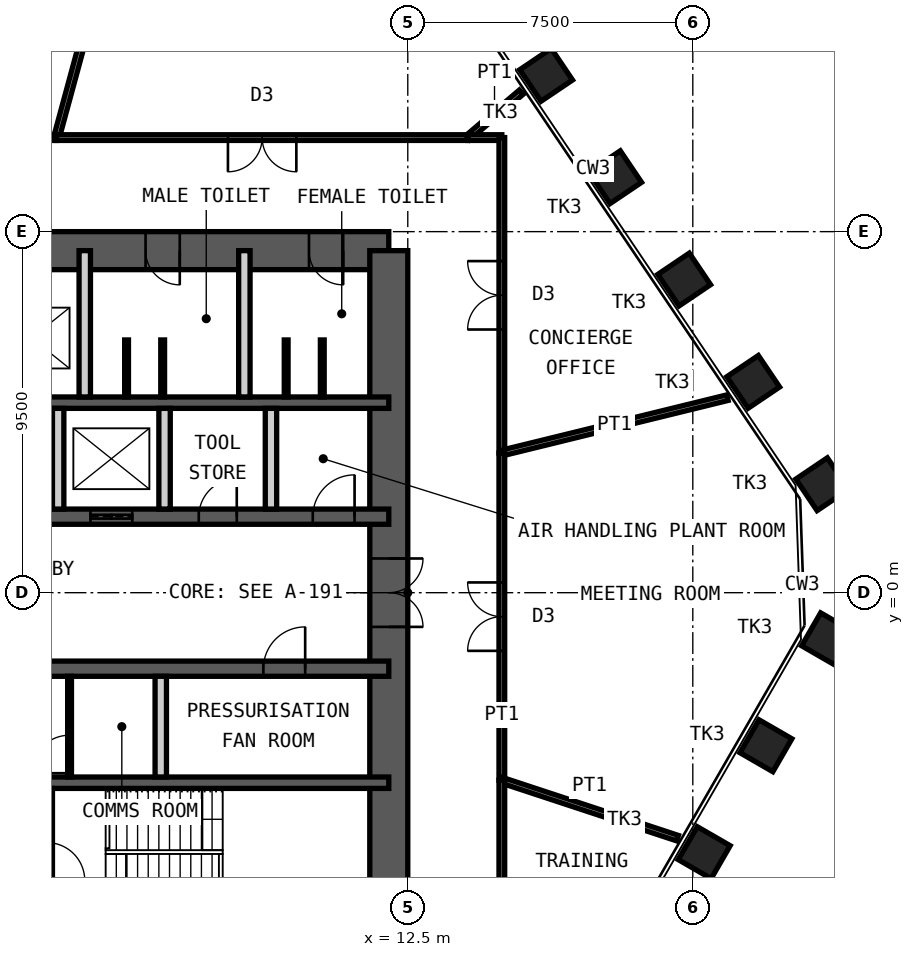
"""IFC4 building model, lengths in metres.
Left out: names, types, materials, properties, quantities, classifications, styles, units other than length and angle.
Written with IfcOpenShell. Run it as: python <this file> out.ifc"""

import sys

from ifc_helpers import new_model, si_unit, direction, frame, frame_2d, origin, origin_2d, place, context, subcontext, project, spatial, rectangle, hollow_rectangle, extrude, element, fill, save


model = new_model("IFC4")
c1 = context("Model", 3, precision=1e-05, world=origin(), true_north=direction((0.0, 1.0)))
c2 = subcontext(c1, "Body", "Model", "MODEL_VIEW")
j1 = project(units=[si_unit("LENGTHUNIT", "METRE"), si_unit("PLANEANGLEUNIT", "RADIAN")], contexts=[c1])
p1 = place(None, origin())
s1 = spatial("IfcSite", under=j1, at=p1, CompositionType="ELEMENT")
p2 = place(p1, origin())
s2 = spatial("IfcBuilding", under=s1, at=p2, CompositionType="ELEMENT")
p3 = place(p2, frame((0.0, 0.0, 262.0)))
s3 = spatial("IfcBuildingStorey", under=s2, at=p3, CompositionType="ELEMENT", Elevation=262.0)
for number, where, z_axis, x_axis in (
    (1, (16.141, 13.625, 0.0), (0.0, 0.0, 1.0), (-0.559, 0.829, 0.0)),
    (2, (17.957, 10.932, 0.0), (0.0, 0.0, 1.0), (-0.559, 0.829, 0.0)),
    (3, (19.773, 8.239, 0.0), (0.0, 0.0, 1.0), (-0.559, 0.829, 0.0)),
    (4, (21.589, 5.547, 0.0), (0.0, 0.0, 1.0), (-0.559, 0.829, 0.0)),
    (5, (23.406, 2.854, 0.0), (0.0, 0.0, 1.0), (-0.559, 0.829, 0.0)),
    (6, (23.548, -1.214, 0.0), (0.0, 0.0, 1.0), (0.5, 0.866, 0.0)),
    (7, (21.924, -4.027, 0.0), (0.0, 0.0, 1.0), (0.5, 0.866, 0.0)),
    (8, (20.3, -6.84, 0.0), (0.0, 0.0, 1.0), (0.5, 0.866, 0.0)),
):
    element("IfcColumn", number, at=place(p3, frame(where, z_axis=z_axis, x_axis=x_axis)), inside=s3, PredefinedType="COLUMN", context=c2, shape_type="SweptSolid", body=[
        extrude(hollow_rectangle(XDim=1.0, YDim=1.0, WallThickness=0.08, at=origin_2d()), origin(), (0.0, 0.0, 1.0), 4.2),
    ])
p4 = place(p3, frame((-12.0, 9.0, 0.0), z_axis=(0.0, 0.0, 1.0), x_axis=(1.0, 0.0, 0.0)))
e9 = element("IfcWall", 9, at=p4, inside=s3, PredefinedType="SHEAR", context=c2, shape_type="SweptSolid", body=[
    extrude(rectangle(XDim=24.0, YDim=1.0, at=frame_2d((12.0, 0.0))), origin(), (0.0, 0.0, 1.0), 4.2),
])
p5 = place(p4, frame((10.4, 0.0, 0.0)))
e10 = element("IfcOpeningElement", 10, at=p5, cuts=e9, PredefinedType="OPENING", context=c2, shape_type="SweptSolid", body=[
    extrude(rectangle(XDim=1.0, YDim=2.1, at=frame_2d((0.5, 1.05))), frame((0.0, 0.51, 0.0), z_axis=(0.0, -1.0, 0.0), x_axis=(1.0, 0.0, 0.0)), (0.0, 0.0, 1.0), 1.02),
])
p6 = place(p4, frame((17.6, 0.0, 0.0)))
e11 = element("IfcOpeningElement", 11, at=p6, cuts=e9, PredefinedType="OPENING", context=c2, shape_type="SweptSolid", body=[
    extrude(rectangle(XDim=0.9, YDim=2.1, at=frame_2d((0.45, 1.05))), frame((0.0, 0.51, 0.0), z_axis=(0.0, -1.0, 0.0), x_axis=(1.0, 0.0, 0.0)), (0.0, 0.0, 1.0), 1.02),
])
p7 = place(p4, frame((21.9, 0.0, 0.0)))
e12 = element("IfcOpeningElement", 12, at=p7, cuts=e9, PredefinedType="OPENING", context=c2, shape_type="SweptSolid", body=[
    extrude(rectangle(XDim=0.9, YDim=2.1, at=frame_2d((0.45, 1.05))), frame((0.0, 0.51, 0.0), z_axis=(0.0, -1.0, 0.0), x_axis=(1.0, 0.0, 0.0)), (0.0, 0.0, 1.0), 1.02),
])
p8 = place(p3, frame((12.0, -9.0, 0.0), z_axis=(0.0, 0.0, 1.0), x_axis=(0.0, 1.0, 0.0)))
e13 = element("IfcWall", 13, at=p8, inside=s3, PredefinedType="SHEAR", context=c2, shape_type="SweptSolid", body=[
    extrude(rectangle(XDim=18.0, YDim=1.0, at=frame_2d((9.0, 0.0))), origin(), (0.0, 0.0, 1.0), 4.2),
])
p9 = place(p8, frame((8.1, 0.0, 0.0)))
e14 = element("IfcOpeningElement", 14, at=p9, cuts=e13, PredefinedType="OPENING", context=c2, shape_type="SweptSolid", body=[
    extrude(rectangle(XDim=1.8, YDim=2.1, at=frame_2d((0.9, 1.05))), frame((0.0, 0.51, 0.0), z_axis=(0.0, -1.0, 0.0), x_axis=(1.0, 0.0, 0.0)), (0.0, 0.0, 1.0), 1.02),
])
p10 = place(p3, frame((-12.0, 5.0, 0.0), z_axis=(0.0, 0.0, 1.0), x_axis=(1.0, 0.0, 0.0)))
e15 = element("IfcWall", 15, at=p10, inside=s3, PredefinedType="SHEAR", context=c2, shape_type="SweptSolid", body=[
    extrude(rectangle(XDim=24.0, YDim=0.3, at=frame_2d((12.0, 0.0))), origin(), (0.0, 0.0, 1.0), 4.2),
])
p11 = place(p3, frame((-12.0, 2.0, 0.0), z_axis=(0.0, 0.0, 1.0), x_axis=(1.0, 0.0, 0.0)))
e16 = element("IfcWall", 16, at=p11, inside=s3, PredefinedType="SHEAR", context=c2, shape_type="SweptSolid", body=[
    extrude(rectangle(XDim=24.0, YDim=0.4, at=frame_2d((12.0, 0.0))), origin(), (0.0, 0.0, 1.0), 4.2),
])
p12 = place(p11, frame((2.4, 0.0, 0.0)))
e17 = element("IfcOpeningElement", 17, at=p12, cuts=e16, PredefinedType="OPENING", context=c2, shape_type="SweptSolid", body=[
    extrude(rectangle(XDim=1.1, YDim=2.1, at=frame_2d((0.55, 1.05))), frame((0.0, 0.21, 0.0), z_axis=(0.0, -1.0, 0.0), x_axis=(1.0, 0.0, 0.0)), (0.0, 0.0, 1.0), 0.42),
])
p13 = place(p11, frame((22.0, 0.0, 0.0)))
e18 = element("IfcOpeningElement", 18, at=p13, cuts=e16, PredefinedType="OPENING", context=c2, shape_type="SweptSolid", body=[
    extrude(rectangle(XDim=1.1, YDim=2.1, at=frame_2d((0.55, 1.05))), frame((0.0, 0.21, 0.0), z_axis=(0.0, -1.0, 0.0), x_axis=(1.0, 0.0, 0.0)), (0.0, 0.0, 1.0), 0.42),
])
p14 = place(p11, frame((10.15, 0.0, 0.0)))
e19 = element("IfcOpeningElement", 19, at=p14, cuts=e16, PredefinedType="OPENING", context=c2, shape_type="SweptSolid", body=[
    extrude(rectangle(XDim=1.0, YDim=2.1, at=frame_2d((0.5, 1.05))), frame((0.0, 0.21, 0.0), z_axis=(0.0, -1.0, 0.0), x_axis=(1.0, 0.0, 0.0)), (0.0, 0.0, 1.0), 0.42),
])
p15 = place(p11, frame((6.9, 0.0, 0.0)))
e20 = element("IfcOpeningElement", 20, at=p15, cuts=e16, PredefinedType="OPENING", context=c2, shape_type="SweptSolid", body=[
    extrude(rectangle(XDim=1.0, YDim=2.1, at=frame_2d((0.5, 1.05))), frame((0.0, 0.21, 0.0), z_axis=(0.0, -1.0, 0.0), x_axis=(1.0, 0.0, 0.0)), (0.0, 0.0, 1.0), 0.42),
])
p16 = place(p11, frame((13.35, 0.0, 0.0)))
e21 = element("IfcOpeningElement", 21, at=p16, cuts=e16, PredefinedType="OPENING", context=c2, shape_type="SweptSolid", body=[
    extrude(rectangle(XDim=1.1, YDim=2.4, at=frame_2d((0.55, 1.2))), frame((0.0, 0.21, 0.0), z_axis=(0.0, -1.0, 0.0), x_axis=(1.0, 0.0, 0.0)), (0.0, 0.0, 1.0), 0.42),
])
p17 = place(p11, frame((16.15, 0.0, 0.0)))
e22 = element("IfcOpeningElement", 22, at=p17, cuts=e16, PredefinedType="OPENING", context=c2, shape_type="SweptSolid", body=[
    extrude(rectangle(XDim=1.1, YDim=2.4, at=frame_2d((0.55, 1.2))), frame((0.0, 0.21, 0.0), z_axis=(0.0, -1.0, 0.0), x_axis=(1.0, 0.0, 0.0)), (0.0, 0.0, 1.0), 0.42),
])
p18 = place(p11, frame((19.0, 0.0, 0.0)))
e23 = element("IfcOpeningElement", 23, at=p18, cuts=e16, PredefinedType="OPENING", context=c2, shape_type="SweptSolid", body=[
    extrude(rectangle(XDim=1.0, YDim=2.1, at=frame_2d((0.5, 1.05))), frame((0.0, 0.21, 0.0), z_axis=(0.0, -1.0, 0.0), x_axis=(1.0, 0.0, 0.0)), (0.0, 0.0, 1.0), 0.42),
])
p19 = place(p3, frame((-12.0, -2.0, 0.0), z_axis=(0.0, 0.0, 1.0), x_axis=(1.0, 0.0, 0.0)))
e24 = element("IfcWall", 24, at=p19, inside=s3, PredefinedType="SHEAR", context=c2, shape_type="SweptSolid", body=[
    extrude(rectangle(XDim=24.0, YDim=0.4, at=frame_2d((12.0, 0.0))), origin(), (0.0, 0.0, 1.0), 4.2),
])
p20 = place(p19, frame((1.1, 0.0, 0.0)))
e25 = element("IfcOpeningElement", 25, at=p20, cuts=e24, PredefinedType="OPENING", context=c2, shape_type="SweptSolid", body=[
    extrude(rectangle(XDim=1.1, YDim=2.1, at=frame_2d((0.55, 1.05))), frame((0.0, 0.21, 0.0), z_axis=(0.0, -1.0, 0.0), x_axis=(1.0, 0.0, 0.0)), (0.0, 0.0, 1.0), 0.42),
])
p21 = place(p19, frame((13.55, 0.0, 0.0)))
e26 = element("IfcOpeningElement", 26, at=p21, cuts=e24, PredefinedType="OPENING", context=c2, shape_type="SweptSolid", body=[
    extrude(rectangle(XDim=1.1, YDim=2.1, at=frame_2d((0.55, 1.05))), frame((0.0, 0.21, 0.0), z_axis=(0.0, -1.0, 0.0), x_axis=(1.0, 0.0, 0.0)), (0.0, 0.0, 1.0), 0.42),
])
p22 = place(p19, frame((20.7, 0.0, 0.0)))
e27 = element("IfcOpeningElement", 27, at=p22, cuts=e24, PredefinedType="OPENING", context=c2, shape_type="SweptSolid", body=[
    extrude(rectangle(XDim=1.1, YDim=2.1, at=frame_2d((0.55, 1.05))), frame((0.0, 0.21, 0.0), z_axis=(0.0, -1.0, 0.0), x_axis=(1.0, 0.0, 0.0)), (0.0, 0.0, 1.0), 0.42),
])
p23 = place(p19, frame((4.0, 0.0, 0.0)))
e28 = element("IfcOpeningElement", 28, at=p23, cuts=e24, PredefinedType="OPENING", context=c2, shape_type="SweptSolid", body=[
    extrude(rectangle(XDim=1.0, YDim=2.1, at=frame_2d((0.5, 1.05))), frame((0.0, 0.21, 0.0), z_axis=(0.0, -1.0, 0.0), x_axis=(1.0, 0.0, 0.0)), (0.0, 0.0, 1.0), 0.42),
])
p24 = place(p19, frame((6.8, 0.0, 0.0)))
e29 = element("IfcOpeningElement", 29, at=p24, cuts=e24, PredefinedType="OPENING", context=c2, shape_type="SweptSolid", body=[
    extrude(rectangle(XDim=1.0, YDim=2.1, at=frame_2d((0.5, 1.05))), frame((0.0, 0.21, 0.0), z_axis=(0.0, -1.0, 0.0), x_axis=(1.0, 0.0, 0.0)), (0.0, 0.0, 1.0), 0.42),
])
p25 = place(p19, frame((9.55, 0.0, 0.0)))
e30 = element("IfcOpeningElement", 30, at=p25, cuts=e24, PredefinedType="OPENING", context=c2, shape_type="SweptSolid", body=[
    extrude(rectangle(XDim=1.1, YDim=2.4, at=frame_2d((0.55, 1.2))), frame((0.0, 0.21, 0.0), z_axis=(0.0, -1.0, 0.0), x_axis=(1.0, 0.0, 0.0)), (0.0, 0.0, 1.0), 0.42),
])
p26 = place(p3, frame((-12.0, -5.0, 0.0), z_axis=(0.0, 0.0, 1.0), x_axis=(1.0, 0.0, 0.0)))
e31 = element("IfcWall", 31, at=p26, inside=s3, PredefinedType="SHEAR", context=c2, shape_type="SweptSolid", body=[
    extrude(rectangle(XDim=24.0, YDim=0.3, at=frame_2d((12.0, 0.0))), origin(), (0.0, 0.0, 1.0), 4.2),
])
for number, where, z_axis, x_axis in (
    (32, (4.0, 5.15, 0.0), (0.0, 0.0, 1.0), (0.0, 1.0, 0.0)),
    (33, (8.2, 5.15, 0.0), (0.0, 0.0, 1.0), (0.0, 1.0, 0.0)),
):
    element("IfcWall", number, at=place(p3, frame(where, z_axis=z_axis, x_axis=x_axis)), inside=s3, PredefinedType="PARTITIONING", context=c2, shape_type="SweptSolid", body=[
        extrude(rectangle(XDim=3.85, YDim=0.3, at=frame_2d((1.925, 0.0))), origin(), (0.0, 0.0, 1.0), 3.98),
    ])
for number, where, z_axis, x_axis in (
    (34, (3.3, 2.2, 0.0), (0.0, 0.0, 1.0), (0.0, 1.0, 0.0)),
    (35, (6.1, 2.2, 0.0), (0.0, 0.0, 1.0), (0.0, 1.0, 0.0)),
    (36, (8.9, 2.2, 0.0), (0.0, 0.0, 1.0), (0.0, 1.0, 0.0)),
    (37, (6.0, -4.85, 0.0), (0.0, 0.0, 1.0), (0.0, 1.0, 0.0)),
):
    element("IfcWall", number, at=place(p3, frame(where, z_axis=z_axis, x_axis=x_axis)), inside=s3, PredefinedType="PARTITIONING", context=c2, shape_type="SweptSolid", body=[
        extrude(rectangle(XDim=2.65, YDim=0.3, at=frame_2d((1.325, 0.0))), origin(), (0.0, 0.0, 1.0), 3.98),
    ])
p27 = place(p3, frame((3.0, -9.0, 0.0), z_axis=(0.0, 0.0, 1.0), x_axis=(0.0, 1.0, 0.0)))
e38 = element("IfcWall", 38, at=p27, inside=s3, PredefinedType="PARTITIONING", context=c2, shape_type="SweptSolid", body=[
    extrude(rectangle(XDim=3.85, YDim=0.3, at=frame_2d((1.925, 0.0))), origin(), (0.0, 0.0, 1.0), 3.98),
])
p28 = place(p27, frame((1.425, 0.0, 0.0)))
e39 = element("IfcOpeningElement", 39, at=p28, cuts=e38, PredefinedType="OPENING", context=c2, shape_type="SweptSolid", body=[
    extrude(rectangle(XDim=1.0, YDim=2.1, at=frame_2d((0.5, 1.05))), frame((0.0, 0.16, 0.0), z_axis=(0.0, -1.0, 0.0), x_axis=(1.0, 0.0, 0.0)), (0.0, 0.0, 1.0), 0.32),
])
p29 = place(p3, frame((3.6, -4.85, 0.0), z_axis=(0.0, 0.0, 1.0), x_axis=(0.0, 1.0, 0.0)))
e40 = element("IfcWall", 40, at=p29, inside=s3, PredefinedType="PARTITIONING", context=c2, shape_type="SweptSolid", body=[
    extrude(rectangle(XDim=2.65, YDim=0.1, at=frame_2d((1.325, 0.0))), origin(), (0.0, 0.0, 1.0), 3.98),
])
p30 = place(p29, frame((0.1, 0.0, 0.0)))
e41 = element("IfcOpeningElement", 41, at=p30, cuts=e40, PredefinedType="OPENING", context=c2, shape_type="SweptSolid", body=[
    extrude(rectangle(XDim=1.0, YDim=2.4, at=frame_2d((0.5, 1.2))), frame((0.0, 0.06, 0.0), z_axis=(0.0, -1.0, 0.0), x_axis=(1.0, 0.0, 0.0)), (0.0, 0.0, 1.0), 0.12),
])
for number, where, z_axis, x_axis in (
    (42, (5.1, 5.15, 0.0), (0.0, 0.0, 1.0), (0.0, 1.0, 0.0)),
    (43, (6.05, 5.15, 0.0), (0.0, 0.0, 1.0), (0.0, 1.0, 0.0)),
    (44, (9.3, 5.15, 0.0), (0.0, 0.0, 1.0), (0.0, 1.0, 0.0)),
    (45, (10.25, 5.15, 0.0), (0.0, 0.0, 1.0), (0.0, 1.0, 0.0)),
):
    element("IfcWall", number, at=place(p3, frame(where, z_axis=z_axis, x_axis=x_axis)), inside=s3, PredefinedType="PARTITIONING", context=c2, shape_type="SweptSolid", body=[
        extrude(rectangle(XDim=1.5, YDim=0.1, at=frame_2d((0.75, 0.0))), origin(), (0.0, 0.0, 1.0), 2.1),
    ])
p31 = place(p3, frame((-2.493, 11.975, 0.0), z_axis=(0.0, 0.0, 1.0), x_axis=(1.0, 0.0, 0.0)))
e46 = element("IfcWall", 46, at=p31, inside=s3, PredefinedType="PARTITIONING", context=c2, shape_type="SweptSolid", body=[
    extrude(rectangle(XDim=5.748, YDim=0.15, at=frame_2d((2.874, 0.0))), origin(), (0.0, 0.0, 1.0), 4.03),
])
p32 = place(p31, frame((1.974, 0.0, 0.0)))
e47 = element("IfcOpeningElement", 47, at=p32, cuts=e46, PredefinedType="OPENING", context=c2, shape_type="SweptSolid", body=[
    extrude(rectangle(XDim=1.8, YDim=2.4, at=frame_2d((0.9, 1.2))), frame((0.0, 0.085, 0.0), z_axis=(0.0, -1.0, 0.0), x_axis=(1.0, 0.0, 0.0)), (0.0, 0.0, 1.0), 0.17),
])
p33 = place(p3, frame((5.492, 20.204, 0.0), z_axis=(0.0, 0.0, 1.0), x_axis=(-0.262317847929, -0.964981526589, 0.0)))
e48 = element("IfcWall", 48, at=p33, inside=s3, PredefinedType="PARTITIONING", context=c2, shape_type="SweptSolid", body=[
    extrude(rectangle(XDim=8.527, YDim=0.15, at=frame_2d((4.264, 0.0))), origin(), (0.0, 0.0, 1.0), 2.93),
])
p34 = place(p3, frame((3.255, 11.975, 0.0), z_axis=(0.0, 0.0, 1.0), x_axis=(1.0, 0.0, 0.0)))
e49 = element("IfcWall", 49, at=p34, inside=s3, PredefinedType="PARTITIONING", context=c2, shape_type="SweptSolid", body=[
    extrude(rectangle(XDim=10.826, YDim=0.15, at=frame_2d((5.413, 0.0))), origin(), (0.0, 0.0, 1.0), 4.03),
])
p35 = place(p34, frame((4.513, 0.0, 0.0)))
e50 = element("IfcOpeningElement", 50, at=p35, cuts=e49, PredefinedType="OPENING", context=c2, shape_type="SweptSolid", body=[
    extrude(rectangle(XDim=1.8, YDim=2.4, at=frame_2d((0.9, 1.2))), frame((0.0, 0.085, 0.0), z_axis=(0.0, -1.0, 0.0), x_axis=(1.0, 0.0, 0.0)), (0.0, 0.0, 1.0), 0.17),
])
p36 = place(p3, frame((15.484, 13.169, 0.0), z_axis=(0.0, 0.0, 1.0), x_axis=(-0.761730014246, -0.647894578923, 0.0)))
e51 = element("IfcWall", 51, at=p36, inside=s3, PredefinedType="PARTITIONING", context=c2, shape_type="SweptSolid", body=[
    extrude(rectangle(XDim=1.842, YDim=0.15, at=frame_2d((0.921, 0.0))), origin(), (0.0, 0.0, 1.0), 2.93),
])
p37 = place(p3, frame((14.081, 11.975, 0.0), z_axis=(0.0, 0.0, 1.0), x_axis=(1.0, 0.0, 0.0)))
e52 = element("IfcWall", 52, at=p37, inside=s3, PredefinedType="PARTITIONING", context=c2, shape_type="SweptSolid", body=[
    extrude(rectangle(XDim=0.895, YDim=0.15, at=frame_2d((0.447, 0.0))), origin(), (0.0, 0.0, 1.0), 4.03),
])
p38 = place(p3, frame((14.975, 11.975, 0.0), z_axis=(0.0, 0.0, 1.0), x_axis=(0.0, -1.0, 0.0)))
e53 = element("IfcWall", 53, at=p38, inside=s3, PredefinedType="PARTITIONING", context=c2, shape_type="SweptSolid", body=[
    extrude(rectangle(XDim=8.301, YDim=0.15, at=frame_2d((4.15, 0.0))), origin(), (0.0, 0.0, 1.0), 4.03),
])
p39 = place(p38, frame((3.25, 0.0, 0.0)))
e54 = element("IfcOpeningElement", 54, at=p39, cuts=e53, PredefinedType="OPENING", context=c2, shape_type="SweptSolid", body=[
    extrude(rectangle(XDim=1.8, YDim=2.4, at=frame_2d((0.9, 1.2))), frame((0.0, 0.085, 0.0), z_axis=(0.0, -1.0, 0.0), x_axis=(1.0, 0.0, 0.0)), (0.0, 0.0, 1.0), 0.17),
])
p40 = place(p3, frame((20.912, 5.131, 0.0), z_axis=(0.0, 0.0, 1.0), x_axis=(-0.971188174719, -0.238313930113, 0.0)))
e55 = element("IfcWall", 55, at=p40, inside=s3, PredefinedType="PARTITIONING", context=c2, shape_type="SweptSolid", body=[
    extrude(rectangle(XDim=6.113, YDim=0.15, at=frame_2d((3.056, 0.0))), origin(), (0.0, 0.0, 1.0), 2.93),
])
p41 = place(p3, frame((14.975, 3.675, 0.0), z_axis=(0.0, 0.0, 1.0), x_axis=(0.0, -1.0, 0.0)))
e56 = element("IfcWall", 56, at=p41, inside=s3, PredefinedType="PARTITIONING", context=c2, shape_type="SweptSolid", body=[
    extrude(rectangle(XDim=8.61, YDim=0.15, at=frame_2d((4.305, 0.0))), origin(), (0.0, 0.0, 1.0), 4.03),
])
p42 = place(p41, frame((3.405, 0.0, 0.0)))
e57 = element("IfcOpeningElement", 57, at=p42, cuts=e56, PredefinedType="OPENING", context=c2, shape_type="SweptSolid", body=[
    extrude(rectangle(XDim=1.8, YDim=2.4, at=frame_2d((0.9, 1.2))), frame((0.0, 0.085, 0.0), z_axis=(0.0, -1.0, 0.0), x_axis=(1.0, 0.0, 0.0)), (0.0, 0.0, 1.0), 0.17),
])
p43 = place(p3, frame((19.598, -6.459, 0.0), z_axis=(0.0, 0.0, 1.0), x_axis=(-0.949751112406, 0.313006109338, 0.0)))
e58 = element("IfcWall", 58, at=p43, inside=s3, PredefinedType="PARTITIONING", context=c2, shape_type="SweptSolid", body=[
    extrude(rectangle(XDim=4.868, YDim=0.15, at=frame_2d((2.434, 0.0))), origin(), (0.0, 0.0, 1.0), 2.93),
])
p44 = place(p3, frame((14.975, -4.935, 0.0), z_axis=(0.0, 0.0, 1.0), x_axis=(0.0, -1.0, 0.0)))
e59 = element("IfcWall", 59, at=p44, inside=s3, PredefinedType="PARTITIONING", context=c2, shape_type="SweptSolid", body=[
    extrude(rectangle(XDim=7.04, YDim=0.15, at=frame_2d((3.52, 0.0))), origin(), (0.0, 0.0, 1.0), 4.03),
])
p45 = place(p44, frame((2.62, 0.0, 0.0)))
e60 = element("IfcOpeningElement", 60, at=p45, cuts=e59, PredefinedType="OPENING", context=c2, shape_type="SweptSolid", body=[
    extrude(rectangle(XDim=1.8, YDim=2.4, at=frame_2d((0.9, 1.2))), frame((0.0, 0.085, 0.0), z_axis=(0.0, -1.0, 0.0), x_axis=(1.0, 0.0, 0.0)), (0.0, 0.0, 1.0), 0.17),
])
p46 = place(p6, origin())
e61 = element("IfcDoor", 61, at=p46, inside=s3, OperationType="SINGLE_SWING_RIGHT", PredefinedType="DOOR", context=c2, shape_type="SweptSolid", body=[
    extrude(rectangle(XDim=0.9, YDim=2.1, at=frame_2d((0.45, 1.05))), frame((0.0, 0.025, 0.0), z_axis=(0.0, -1.0, 0.0), x_axis=(1.0, 0.0, 0.0)), (0.0, 0.0, 1.0), 0.05),
])
fill(e11, e61)
p47 = place(p7, origin())
e62 = element("IfcDoor", 62, at=p47, inside=s3, OperationType="SINGLE_SWING_RIGHT", PredefinedType="DOOR", context=c2, shape_type="SweptSolid", body=[
    extrude(rectangle(XDim=0.9, YDim=2.1, at=frame_2d((0.45, 1.05))), frame((0.0, 0.025, 0.0), z_axis=(0.0, -1.0, 0.0), x_axis=(1.0, 0.0, 0.0)), (0.0, 0.0, 1.0), 0.05),
])
fill(e12, e62)
p48 = place(p13, origin())
e63 = element("IfcDoor", 63, at=p48, inside=s3, OperationType="SINGLE_SWING_LEFT", PredefinedType="DOOR", context=c2, shape_type="SweptSolid", body=[
    extrude(rectangle(XDim=1.1, YDim=2.1, at=frame_2d((0.55, 1.05))), frame((0.0, 0.025, 0.0), z_axis=(0.0, -1.0, 0.0), x_axis=(1.0, 0.0, 0.0)), (0.0, 0.0, 1.0), 0.05),
])
fill(e18, e63)
p49 = place(p22, origin())
e64 = element("IfcDoor", 64, at=p49, inside=s3, OperationType="SINGLE_SWING_LEFT", PredefinedType="DOOR", context=c2, shape_type="SweptSolid", body=[
    extrude(rectangle(XDim=1.1, YDim=2.1, at=frame_2d((0.55, 1.05))), frame((0.0, 0.025, 0.0), z_axis=(0.0, -1.0, 0.0), x_axis=(1.0, 0.0, 0.0)), (0.0, 0.0, 1.0), 0.05),
])
fill(e27, e64)
p50 = place(p9, origin())
e65 = element("IfcDoor", 65, at=p50, inside=s3, OperationType="DOUBLE_DOOR_DOUBLE_SWING", PredefinedType="DOOR", context=c2, shape_type="SweptSolid", body=[
    extrude(rectangle(XDim=1.8, YDim=2.1, at=frame_2d((0.9, 1.05))), frame((0.0, 0.025, 0.0), z_axis=(0.0, -1.0, 0.0), x_axis=(1.0, 0.0, 0.0)), (0.0, 0.0, 1.0), 0.05),
])
fill(e14, e65)
p51 = place(p17, origin())
e66 = element("IfcDoor", 66, at=p51, inside=s3, OperationType="DOUBLE_DOOR_SLIDING", PredefinedType="DOOR", context=c2, shape_type="SweptSolid", body=[
    extrude(rectangle(XDim=1.1, YDim=2.4, at=frame_2d((0.55, 1.2))), frame((0.0, 0.025, 0.0), z_axis=(0.0, -1.0, 0.0), x_axis=(1.0, 0.0, 0.0)), (0.0, 0.0, 1.0), 0.05),
])
fill(e22, e66)
p52 = place(p18, origin())
e67 = element("IfcDoor", 67, at=p52, inside=s3, OperationType="SINGLE_SWING_LEFT", PredefinedType="DOOR", context=c2, shape_type="SweptSolid", body=[
    extrude(rectangle(XDim=1.0, YDim=2.1, at=frame_2d((0.5, 1.05))), frame((0.0, 0.025, 0.0), z_axis=(0.0, -1.0, 0.0), x_axis=(1.0, 0.0, 0.0)), (0.0, 0.0, 1.0), 0.05),
])
fill(e23, e67)
p53 = place(p30, origin())
e68 = element("IfcDoor", 68, at=p53, inside=s3, OperationType="SINGLE_SWING_RIGHT", PredefinedType="DOOR", context=c2, shape_type="SweptSolid", body=[
    extrude(rectangle(XDim=1.0, YDim=2.4, at=frame_2d((0.5, 1.2))), frame((0.0, 0.025, 0.0), z_axis=(0.0, -1.0, 0.0), x_axis=(1.0, 0.0, 0.0)), (0.0, 0.0, 1.0), 0.05),
])
fill(e41, e68)
p54 = place(p35, origin())
e69 = element("IfcDoor", 69, at=p54, inside=s3, OperationType="DOUBLE_DOOR_DOUBLE_SWING", PredefinedType="DOOR", context=c2, shape_type="SweptSolid", body=[
    extrude(rectangle(XDim=1.8, YDim=2.4, at=frame_2d((0.9, 1.2))), frame((0.0, 0.025, 0.0), z_axis=(0.0, -1.0, 0.0), x_axis=(1.0, 0.0, 0.0)), (0.0, 0.0, 1.0), 0.05),
])
fill(e50, e69)
p55 = place(p39, origin())
e70 = element("IfcDoor", 70, at=p55, inside=s3, OperationType="DOUBLE_DOOR_DOUBLE_SWING", PredefinedType="DOOR", context=c2, shape_type="SweptSolid", body=[
    extrude(rectangle(XDim=1.8, YDim=2.4, at=frame_2d((0.9, 1.2))), frame((0.0, 0.025, 0.0), z_axis=(0.0, -1.0, 0.0), x_axis=(1.0, 0.0, 0.0)), (0.0, 0.0, 1.0), 0.05),
])
fill(e54, e70)
p56 = place(p42, origin())
e71 = element("IfcDoor", 71, at=p56, inside=s3, OperationType="DOUBLE_DOOR_DOUBLE_SWING", PredefinedType="DOOR", context=c2, shape_type="SweptSolid", body=[
    extrude(rectangle(XDim=1.8, YDim=2.4, at=frame_2d((0.9, 1.2))), frame((0.0, 0.025, 0.0), z_axis=(0.0, -1.0, 0.0), x_axis=(1.0, 0.0, 0.0)), (0.0, 0.0, 1.0), 0.05),
])
fill(e57, e71)
save(model, sys.argv[1])
